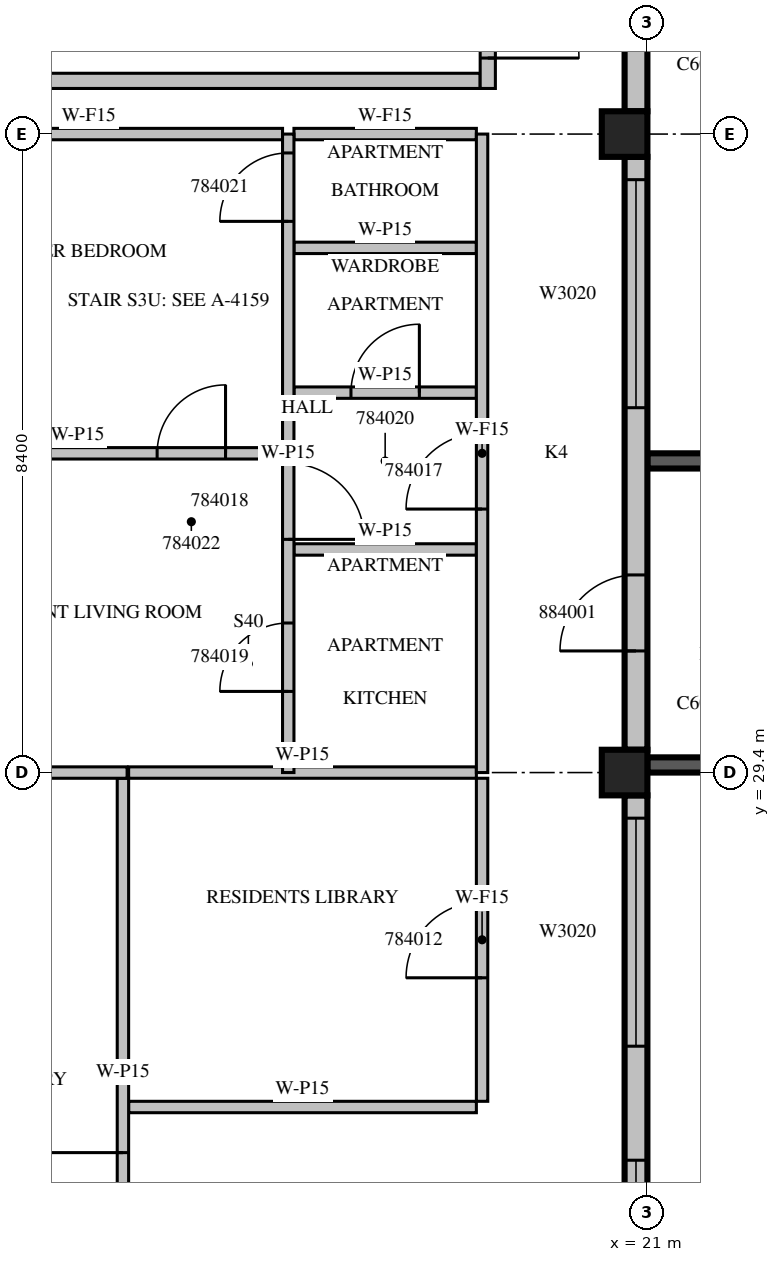
"""IFC4 building model, lengths in metres.
Left out: names, types, materials, properties, quantities, classifications, styles, units other than length and angle.
Written with IfcOpenShell. Run it as: python <this file> out.ifc"""

import sys

from ifc_helpers import new_model, si_unit, direction, frame, frame_2d, origin, origin_2d, place, context, subcontext, project, spatial, rectangle, extrude, source, transform, mapped, element, fill, save


model = new_model("IFC4")
c1 = context("Model", 3, precision=1e-05, world=origin(), true_north=direction((0.0, 1.0)))
c2 = subcontext(c1, "Body", "Model", "MODEL_VIEW")
j1 = project(units=[si_unit("LENGTHUNIT", "METRE"), si_unit("PLANEANGLEUNIT", "RADIAN")], contexts=[c1])
p1 = place(None, origin())
s1 = spatial("IfcSite", under=j1, at=p1, CompositionType="ELEMENT")
p2 = place(p1, origin())
s2 = spatial("IfcBuilding", under=s1, at=p2, CompositionType="ELEMENT")
p3 = place(p2, frame((0.0, 0.0, 354.5)))
s3 = spatial("IfcBuildingStorey", under=s2, at=p3, CompositionType="ELEMENT", Elevation=354.5)
m1 = source(origin(), c2, "Body", "SweptSolid", [
    extrude(rectangle(XDim=0.6, YDim=0.6, at=origin_2d()), origin(), (0.0, 0.0, 1.0), 3.5),
])
for number, where, z_axis, x_axis in (
    (1, (20.7, 29.4, 0.0), (0.0, 0.0, 1.0), (1.0, 0.0, 0.0)),
    (2, (20.7, 37.8, 0.0), (0.0, 0.0, 1.0), (1.0, 0.0, 0.0)),
):
    element("IfcColumn", number, at=place(p3, frame(where, z_axis=z_axis, x_axis=x_axis)), inside=s3, PredefinedType="COLUMN", context=c2, shape_type="MappedRepresentation", body=[
        mapped(m1, transform((0.0, 0.0, 0.0), scale=1.0)),
    ])
m2 = source(origin(), c2, "Body", "SweptSolid", [
    extrude(rectangle(XDim=3.9, YDim=0.2, at=frame_2d((1.95, 0.0))), origin(), (0.0, 0.0, 1.0), 3.1),
])
p4 = place(p3, frame((21.0, 29.5, 0.0), z_axis=(0.0, 0.0, 1.0), x_axis=(1.0, 0.0, 0.0)))
e3 = element("IfcWall", 3, at=p4, inside=s3, PredefinedType="SOLIDWALL", context=c2, shape_type="MappedRepresentation", body=[
    mapped(m2, transform((0.0, 0.0, 0.0), scale=1.0)),
])
m3 = source(origin(), c2, "Body", "SweptSolid", [
    extrude(rectangle(XDim=2.4, YDim=2.0, at=frame_2d((1.2, 1.0))), frame((0.0, 0.11, 0.0), z_axis=(0.0, -1.0, 0.0), x_axis=(1.0, 0.0, 0.0)), (0.0, 0.0, 1.0), 0.22),
])
p5 = place(p4, frame((0.75, 0.0, 0.6)))
e4 = element("IfcOpeningElement", 4, at=p5, cuts=e3, PredefinedType="OPENING", context=c2, shape_type="MappedRepresentation", body=[
    mapped(m3, transform((0.0, 0.0, 0.0), scale=1.0)),
])
p6 = place(p3, frame((21.0, 33.5, 0.0), z_axis=(0.0, 0.0, 1.0), x_axis=(1.0, 0.0, 0.0)))
e5 = element("IfcWall", 5, at=p6, inside=s3, PredefinedType="SOLIDWALL", context=c2, shape_type="MappedRepresentation", body=[
    mapped(m2, transform((0.0, 0.0, 0.0), scale=1.0)),
])
p7 = place(p6, frame((0.75, 0.0, 0.6)))
e6 = element("IfcOpeningElement", 6, at=p7, cuts=e5, PredefinedType="OPENING", context=c2, shape_type="MappedRepresentation", body=[
    mapped(m3, transform((0.0, 0.0, 0.0), scale=1.0)),
])
m4 = source(origin(), c2, "Body", "SweptSolid", [
    extrude(rectangle(XDim=7.5, YDim=0.3, at=frame_2d((3.75, 0.0))), origin(), (0.0, 0.0, 1.0), 3.1),
])
p8 = place(p3, frame((20.85, 21.6, 0.0), z_axis=(0.0, 0.0, 1.0), x_axis=(0.0, 1.0, 0.0)))
e7 = element("IfcWall", 7, at=p8, inside=s3, PredefinedType="STANDARD", context=c2, shape_type="MappedRepresentation", body=[
    mapped(m4, transform((0.0, 0.0, 0.0), scale=1.0)),
])
m5 = source(origin(), c2, "Body", "SweptSolid", [
    extrude(rectangle(XDim=2.4, YDim=2.0, at=frame_2d((1.2, 1.0))), frame((0.0, 0.16, 0.0), z_axis=(0.0, -1.0, 0.0), x_axis=(1.0, 0.0, 0.0)), (0.0, 0.0, 1.0), 0.32),
])
p9 = place(p8, frame((0.3, 0.0, 0.6)))
e8 = element("IfcOpeningElement", 8, at=p9, cuts=e7, PredefinedType="OPENING", context=c2, shape_type="MappedRepresentation", body=[
    mapped(m5, transform((0.0, 0.0, 0.0), scale=1.0)),
])
m6 = source(origin(), c2, "Body", "SweptSolid", [
    extrude(rectangle(XDim=3.0, YDim=2.0, at=frame_2d((1.5, 1.0))), frame((0.0, 0.16, 0.0), z_axis=(0.0, -1.0, 0.0), x_axis=(1.0, 0.0, 0.0)), (0.0, 0.0, 1.0), 0.32),
])
p10 = place(p8, frame((4.2, 0.0, 0.6)))
e9 = element("IfcOpeningElement", 9, at=p10, cuts=e7, PredefinedType="OPENING", context=c2, shape_type="MappedRepresentation", body=[
    mapped(m6, transform((0.0, 0.0, 0.0), scale=1.0)),
])
m7 = source(origin(), c2, "Body", "SweptSolid", [
    extrude(rectangle(XDim=7.8, YDim=0.3, at=frame_2d((3.9, 0.0))), origin(), (0.0, 0.0, 1.0), 3.1),
])
p11 = place(p3, frame((20.85, 29.7, 0.0), z_axis=(0.0, 0.0, 1.0), x_axis=(0.0, 1.0, 0.0)))
e10 = element("IfcWall", 10, at=p11, inside=s3, PredefinedType="STANDARD", context=c2, shape_type="MappedRepresentation", body=[
    mapped(m7, transform((0.0, 0.0, 0.0), scale=1.0)),
])
p12 = place(p11, frame((4.5, 0.0, 0.6)))
e11 = element("IfcOpeningElement", 11, at=p12, cuts=e10, PredefinedType="OPENING", context=c2, shape_type="MappedRepresentation", body=[
    mapped(m6, transform((0.0, 0.0, 0.0), scale=1.0)),
])
m8 = source(origin(), c2, "Body", "SweptSolid", [
    extrude(rectangle(XDim=1.0, YDim=2.1, at=frame_2d((0.5, 1.05))), frame((0.0, 0.16, 0.0), z_axis=(0.0, -1.0, 0.0), x_axis=(1.0, 0.0, 0.0)), (0.0, 0.0, 1.0), 0.32),
])
p13 = place(p11, frame((1.3, 0.0, 0.0)))
e12 = element("IfcOpeningElement", 12, at=p13, cuts=e10, PredefinedType="OPENING", context=c2, shape_type="MappedRepresentation", body=[
    mapped(m8, transform((0.0, 0.0, 0.0), scale=1.0)),
])
m9 = source(origin(), c2, "Body", "SweptSolid", [
    extrude(rectangle(XDim=5.58, YDim=0.3, at=frame_2d((2.79, 0.0))), origin(), (0.0, 0.0, 1.0), 3.1),
])
p14 = place(p3, frame((20.85, 38.1, 0.0), z_axis=(0.0, 0.0, 1.0), x_axis=(0.0, 1.0, 0.0)))
e13 = element("IfcWall", 13, at=p14, inside=s3, PredefinedType="STANDARD", context=c2, shape_type="MappedRepresentation", body=[
    mapped(m9, transform((0.0, 0.0, 0.0), scale=1.0)),
])
m10 = source(origin(), c2, "Body", "SweptSolid", [
    extrude(rectangle(XDim=3.6, YDim=2.0, at=frame_2d((1.8, 1.0))), frame((0.0, 0.16, 0.0), z_axis=(0.0, -1.0, 0.0), x_axis=(1.0, 0.0, 0.0)), (0.0, 0.0, 1.0), 0.32),
])
p15 = place(p14, frame((0.84, 0.0, 0.6)))
e14 = element("IfcOpeningElement", 14, at=p15, cuts=e13, PredefinedType="OPENING", context=c2, shape_type="MappedRepresentation", body=[
    mapped(m10, transform((0.0, 0.0, 0.0), scale=1.0)),
])
m11 = source(origin(), c2, "Body", "SweptSolid", [
    extrude(rectangle(XDim=8.0, YDim=0.2, at=frame_2d((4.0, 0.0))), origin(), (0.0, 0.0, 1.0), 3.1),
])
p16 = place(p3, frame((10.8, 38.5, 0.0), z_axis=(0.0, 0.0, 1.0), x_axis=(1.0, 0.0, 0.0)))
e15 = element("IfcWall", 15, at=p16, inside=s3, PredefinedType="PARTITIONING", context=c2, shape_type="MappedRepresentation", body=[
    mapped(m11, transform((0.0, 0.0, 0.0), scale=1.0)),
])
m12 = source(origin(), c2, "Body", "SweptSolid", [
    extrude(rectangle(XDim=5.45, YDim=0.2, at=frame_2d((2.725, 0.0))), origin(), (0.0, 0.0, 1.0), 3.1),
])
p17 = place(p3, frame((18.9, 38.4, 0.0), z_axis=(0.0, 0.0, 1.0), x_axis=(0.0, 1.0, 0.0)))
e16 = element("IfcWall", 16, at=p17, inside=s3, PredefinedType="PARTITIONING", context=c2, shape_type="MappedRepresentation", body=[
    mapped(m12, transform((0.0, 0.0, 0.0), scale=1.0)),
])
m13 = source(origin(), c2, "Body", "SweptSolid", [
    extrude(rectangle(XDim=1.2, YDim=2.1, at=frame_2d((0.6, 1.05))), frame((0.0, 0.11, 0.0), z_axis=(0.0, -1.0, 0.0), x_axis=(1.0, 0.0, 0.0)), (0.0, 0.0, 1.0), 0.22),
])
p18 = place(p17, frame((0.4, 0.0, 0.0)))
e17 = element("IfcOpeningElement", 17, at=p18, cuts=e16, PredefinedType="OPENING", context=c2, shape_type="MappedRepresentation", body=[
    mapped(m13, transform((0.0, 0.0, 0.0), scale=1.0)),
])
m14 = source(origin(), c2, "Body", "SweptSolid", [
    extrude(rectangle(XDim=0.9, YDim=2.1, at=frame_2d((0.45, 1.05))), frame((0.0, 0.11, 0.0), z_axis=(0.0, -1.0, 0.0), x_axis=(1.0, 0.0, 0.0)), (0.0, 0.0, 1.0), 0.22),
])
p19 = place(p17, frame((3.25, 0.0, 0.0)))
e18 = element("IfcOpeningElement", 18, at=p19, cuts=e16, PredefinedType="OPENING", context=c2, shape_type="MappedRepresentation", body=[
    mapped(m14, transform((0.0, 0.0, 0.0), scale=1.0)),
])
m15 = source(origin(), c2, "Body", "SweptSolid", [
    extrude(rectangle(XDim=4.575, YDim=0.15, at=frame_2d((2.288, 0.0))), origin(), (0.0, 0.0, 1.0), 3.1),
])
for number, where, z_axis, x_axis in (
    (19, (14.175, 25.0, 0.0), (0.0, 0.0, 1.0), (1.0, 0.0, 0.0)),
    (20, (18.75, 29.4, 0.0), (0.0, 0.0, 1.0), (-1.0, 0.0, 0.0)),
):
    element("IfcWall", number, at=place(p3, frame(where, z_axis=z_axis, x_axis=x_axis)), inside=s3, PredefinedType="PARTITIONING", context=c2, shape_type="MappedRepresentation", body=[
        mapped(m15, transform((0.0, 0.0, 0.0), scale=1.0)),
    ])
m16 = source(origin(), c2, "Body", "SweptSolid", [
    extrude(rectangle(XDim=4.25, YDim=0.15, at=frame_2d((2.125, 0.0))), origin(), (0.0, 0.0, 1.0), 3.1),
])
p20 = place(p3, frame((18.825, 25.075, 0.0), z_axis=(0.0, 0.0, 1.0), x_axis=(0.0, 1.0, 0.0)))
e21 = element("IfcWall", 21, at=p20, inside=s3, PredefinedType="PARTITIONING", context=c2, shape_type="MappedRepresentation", body=[
    mapped(m16, transform((0.0, 0.0, 0.0), scale=1.0)),
])
m17 = source(origin(), c2, "Body", "SweptSolid", [
    extrude(rectangle(XDim=1.0, YDim=2.1, at=frame_2d((0.5, 1.05))), frame((0.0, 0.085, 0.0), z_axis=(0.0, -1.0, 0.0), x_axis=(1.0, 0.0, 0.0)), (0.0, 0.0, 1.0), 0.17),
])
p21 = place(p20, frame((1.625, 0.0, 0.0)))
e22 = element("IfcOpeningElement", 22, at=p21, cuts=e21, PredefinedType="OPENING", context=c2, shape_type="MappedRepresentation", body=[
    mapped(m17, transform((0.0, 0.0, 0.0), scale=1.0)),
])
m18 = source(origin(), c2, "Body", "SweptSolid", [
    extrude(rectangle(XDim=7.725, YDim=0.15, at=frame_2d((3.862, 0.0))), origin(), (0.0, 0.0, 1.0), 3.1),
])
p22 = place(p3, frame((14.1, 29.325, 0.0), z_axis=(0.0, 0.0, 1.0), x_axis=(0.0, -1.0, 0.0)))
e23 = element("IfcWall", 23, at=p22, inside=s3, PredefinedType="PARTITIONING", context=c2, shape_type="MappedRepresentation", body=[
    mapped(m18, transform((0.0, 0.0, 0.0), scale=1.0)),
])
m19 = source(origin(), c2, "Body", "SweptSolid", [
    extrude(rectangle(XDim=2.2, YDim=2.1, at=frame_2d((1.1, 1.05))), frame((0.0, 0.085, 0.0), z_axis=(0.0, -1.0, 0.0), x_axis=(1.0, 0.0, 0.0)), (0.0, 0.0, 1.0), 0.17),
])
p23 = place(p22, frame((4.925, 0.0, 0.0)))
e24 = element("IfcOpeningElement", 24, at=p23, cuts=e23, PredefinedType="OPENING", context=c2, shape_type="MappedRepresentation", body=[
    mapped(m19, transform((0.0, 0.0, 0.0), scale=1.0)),
])
m20 = source(origin(), c2, "Body", "SweptSolid", [
    extrude(rectangle(XDim=5.4, YDim=0.15, at=frame_2d((2.7, 0.0))), origin(), (0.0, 0.0, 1.0), 3.1),
])
p24 = place(p3, frame((16.2, 33.6, 0.0), z_axis=(0.0, 0.0, 1.0), x_axis=(-1.0, 0.0, 0.0)))
e25 = element("IfcWall", 25, at=p24, inside=s3, PredefinedType="PARTITIONING", context=c2, shape_type="MappedRepresentation", body=[
    mapped(m20, transform((0.0, 0.0, 0.0), scale=1.0)),
])
m21 = source(origin(), c2, "Body", "SweptSolid", [
    extrude(rectangle(XDim=0.9, YDim=2.1, at=frame_2d((0.45, 1.05))), frame((0.0, 0.085, 0.0), z_axis=(0.0, -1.0, 0.0), x_axis=(1.0, 0.0, 0.0)), (0.0, 0.0, 1.0), 0.17),
])
p25 = place(p24, frame((0.75, 0.0, 0.0)))
e26 = element("IfcOpeningElement", 26, at=p25, cuts=e25, PredefinedType="OPENING", context=c2, shape_type="MappedRepresentation", body=[
    mapped(m21, transform((0.0, 0.0, 0.0), scale=1.0)),
])
m22 = source(origin(), c2, "Body", "SweptSolid", [
    extrude(rectangle(XDim=2.4, YDim=0.15, at=frame_2d((1.2, 0.0))), origin(), (0.0, 0.0, 1.0), 3.1),
])
p26 = place(p3, frame((18.75, 32.335, 0.0), z_axis=(0.0, 0.0, 1.0), x_axis=(-1.0, 0.0, 0.0)))
e27 = element("IfcWall", 27, at=p26, inside=s3, PredefinedType="PARTITIONING", context=c2, shape_type="MappedRepresentation", body=[
    mapped(m22, transform((0.0, 0.0, 0.0), scale=1.0)),
])
p27 = place(p3, frame((18.75, 34.398, 0.0), z_axis=(0.0, 0.0, 1.0), x_axis=(-1.0, 0.0, 0.0)))
e28 = element("IfcWall", 28, at=p27, inside=s3, PredefinedType="PARTITIONING", context=c2, shape_type="MappedRepresentation", body=[
    mapped(m22, transform((0.0, 0.0, 0.0), scale=1.0)),
])
p28 = place(p27, frame((0.75, 0.0, 0.0)))
e29 = element("IfcOpeningElement", 29, at=p28, cuts=e28, PredefinedType="OPENING", context=c2, shape_type="MappedRepresentation", body=[
    mapped(m21, transform((0.0, 0.0, 0.0), scale=1.0)),
])
p29 = place(p3, frame((18.75, 36.303, 0.0), z_axis=(0.0, 0.0, 1.0), x_axis=(-1.0, 0.0, 0.0)))
e30 = element("IfcWall", 30, at=p29, inside=s3, PredefinedType="PARTITIONING", context=c2, shape_type="MappedRepresentation", body=[
    mapped(m22, transform((0.0, 0.0, 0.0), scale=1.0)),
])
m23 = source(origin(), c2, "Body", "SweptSolid", [
    extrude(rectangle(XDim=3.056, YDim=0.15, at=frame_2d((1.528, 0.0))), origin(), (0.0, 0.0, 1.0), 3.1),
])
p30 = place(p3, frame((14.155, 29.4, 0.0), z_axis=(0.0, 0.0, 1.0), x_axis=(-1.0, 0.0, 0.0)))
e31 = element("IfcWall", 31, at=p30, inside=s3, PredefinedType="PARTITIONING", context=c2, shape_type="MappedRepresentation", body=[
    mapped(m23, transform((0.0, 0.0, 0.0), scale=1.0)),
])
m24 = source(origin(), c2, "Body", "SweptSolid", [
    extrude(rectangle(XDim=5.101, YDim=0.15, at=frame_2d((2.55, 0.0))), origin(), (0.0, 0.0, 1.0), 3.1),
])
p31 = place(p3, frame((16.2, 37.8, 0.0), z_axis=(0.0, 0.0, 1.0), x_axis=(-1.0, 0.0, 0.0)))
e32 = element("IfcWall", 32, at=p31, inside=s3, PredefinedType="PARTITIONING", context=c2, shape_type="MappedRepresentation", body=[
    mapped(m24, transform((0.0, 0.0, 0.0), scale=1.0)),
])
p32 = place(p3, frame((18.75, 37.8, 0.0), z_axis=(0.0, 0.0, 1.0), x_axis=(-1.0, 0.0, 0.0)))
e33 = element("IfcWall", 33, at=p32, inside=s3, PredefinedType="PARTITIONING", context=c2, shape_type="MappedRepresentation", body=[
    mapped(m22, transform((0.0, 0.0, 0.0), scale=1.0)),
])
m25 = source(origin(), c2, "Body", "SweptSolid", [
    extrude(rectangle(XDim=8.4, YDim=0.15, at=frame_2d((4.2, 0.0))), origin(), (0.0, 0.0, 1.0), 3.1),
])
p33 = place(p3, frame((16.275, 29.4, 0.0), z_axis=(0.0, 0.0, 1.0), x_axis=(0.0, 1.0, 0.0)))
e34 = element("IfcWall", 34, at=p33, inside=s3, PredefinedType="PARTITIONING", context=c2, shape_type="MappedRepresentation", body=[
    mapped(m25, transform((0.0, 0.0, 0.0), scale=1.0)),
])
p34 = place(p33, frame((3.068, 0.0, 0.0)))
e35 = element("IfcOpeningElement", 35, at=p34, cuts=e34, PredefinedType="OPENING", context=c2, shape_type="MappedRepresentation", body=[
    mapped(m17, transform((0.0, 0.0, 0.0), scale=1.0)),
])
p35 = place(p33, frame((1.067, 0.0, 0.0)))
e36 = element("IfcOpeningElement", 36, at=p35, cuts=e34, PredefinedType="OPENING", context=c2, shape_type="MappedRepresentation", body=[
    mapped(m21, transform((0.0, 0.0, 0.0), scale=1.0)),
])
p36 = place(p33, frame((7.252, 0.0, 0.0)))
e37 = element("IfcOpeningElement", 37, at=p36, cuts=e34, PredefinedType="OPENING", context=c2, shape_type="MappedRepresentation", body=[
    mapped(m21, transform((0.0, 0.0, 0.0), scale=1.0)),
])
p37 = place(p3, frame((18.825, 29.4, 0.0), z_axis=(0.0, 0.0, 1.0), x_axis=(0.0, 1.0, 0.0)))
e38 = element("IfcWall", 38, at=p37, inside=s3, PredefinedType="PARTITIONING", context=c2, shape_type="MappedRepresentation", body=[
    mapped(m25, transform((0.0, 0.0, 0.0), scale=1.0)),
])
p38 = place(p37, frame((3.467, 0.0, 0.0)))
e39 = element("IfcOpeningElement", 39, at=p38, cuts=e38, PredefinedType="OPENING", context=c2, shape_type="MappedRepresentation", body=[
    mapped(m17, transform((0.0, 0.0, 0.0), scale=1.0)),
])
m26 = source(origin(), c2, "Body", "SweptSolid", [
    extrude(rectangle(XDim=2.4, YDim=2.0, at=frame_2d((1.2, 1.0))), frame((0.0, 0.03, 0.0), z_axis=(0.0, -1.0, 0.0), x_axis=(1.0, 0.0, 0.0)), (0.0, 0.0, 1.0), 0.06),
])
p39 = place(p9, origin())
e40 = element("IfcWindow", 40, at=p39, inside=s3, PartitioningType="SINGLE_PANEL", PredefinedType="WINDOW", context=c2, shape_type="MappedRepresentation", body=[
    mapped(m26, transform((0.0, 0.0, 0.0), scale=1.0)),
])
fill(e8, e40)
m27 = source(origin(), c2, "Body", "SweptSolid", [
    extrude(rectangle(XDim=3.0, YDim=2.0, at=frame_2d((1.5, 1.0))), frame((0.0, 0.03, 0.0), z_axis=(0.0, -1.0, 0.0), x_axis=(1.0, 0.0, 0.0)), (0.0, 0.0, 1.0), 0.06),
])
p40 = place(p10, origin())
e41 = element("IfcWindow", 41, at=p40, inside=s3, PartitioningType="SINGLE_PANEL", PredefinedType="WINDOW", context=c2, shape_type="MappedRepresentation", body=[
    mapped(m27, transform((0.0, 0.0, 0.0), scale=1.0)),
])
fill(e9, e41)
p41 = place(p12, origin())
e42 = element("IfcWindow", 42, at=p41, inside=s3, PartitioningType="SINGLE_PANEL", PredefinedType="WINDOW", context=c2, shape_type="MappedRepresentation", body=[
    mapped(m27, transform((0.0, 0.0, 0.0), scale=1.0)),
])
fill(e11, e42)
m28 = source(origin(), c2, "Body", "SweptSolid", [
    extrude(rectangle(XDim=1.2, YDim=2.1, at=frame_2d((0.6, 1.05))), frame((0.0, 0.025, 0.0), z_axis=(0.0, -1.0, 0.0), x_axis=(1.0, 0.0, 0.0)), (0.0, 0.0, 1.0), 0.05),
])
p42 = place(p18, origin())
e43 = element("IfcDoor", 43, at=p42, inside=s3, OperationType="SINGLE_SWING_RIGHT", PredefinedType="DOOR", context=c2, shape_type="MappedRepresentation", body=[
    mapped(m28, transform((0.0, 0.0, 0.0), scale=1.0)),
])
fill(e17, e43)
m29 = source(origin(), c2, "Body", "SweptSolid", [
    extrude(rectangle(XDim=1.0, YDim=2.1, at=frame_2d((0.5, 1.05))), frame((0.0, 0.025, 0.0), z_axis=(0.0, -1.0, 0.0), x_axis=(1.0, 0.0, 0.0)), (0.0, 0.0, 1.0), 0.05),
])
p43 = place(p21, origin())
e44 = element("IfcDoor", 44, at=p43, inside=s3, OperationType="SINGLE_SWING_LEFT", PredefinedType="DOOR", context=c2, shape_type="MappedRepresentation", body=[
    mapped(m29, transform((0.0, 0.0, 0.0), scale=1.0)),
])
fill(e22, e44)
m30 = source(origin(), c2, "Body", "SweptSolid", [
    extrude(rectangle(XDim=2.2, YDim=2.1, at=frame_2d((1.1, 1.05))), frame((0.0, 0.025, 0.0), z_axis=(0.0, -1.0, 0.0), x_axis=(1.0, 0.0, 0.0)), (0.0, 0.0, 1.0), 0.05),
])
p44 = place(p23, origin())
e45 = element("IfcDoor", 45, at=p44, inside=s3, OperationType="DOUBLE_DOOR_SINGLE_SWING", PredefinedType="DOOR", context=c2, shape_type="MappedRepresentation", body=[
    mapped(m30, transform((0.0, 0.0, 0.0), scale=1.0)),
])
fill(e24, e45)
p45 = place(p38, origin())
e46 = element("IfcDoor", 46, at=p45, inside=s3, OperationType="SINGLE_SWING_LEFT", PredefinedType="DOOR", context=c2, shape_type="MappedRepresentation", body=[
    mapped(m29, transform((0.0, 0.0, 0.0), scale=1.0)),
])
fill(e39, e46)
p46 = place(p34, origin())
e47 = element("IfcDoor", 47, at=p46, inside=s3, OperationType="SINGLE_SWING_RIGHT", PredefinedType="DOOR", context=c2, shape_type="MappedRepresentation", body=[
    mapped(m29, transform((0.0, 0.0, 0.0), scale=1.0)),
])
fill(e35, e47)
m31 = source(origin(), c2, "Body", "SweptSolid", [
    extrude(rectangle(XDim=0.9, YDim=2.1, at=frame_2d((0.45, 1.05))), frame((0.0, 0.025, 0.0), z_axis=(0.0, -1.0, 0.0), x_axis=(1.0, 0.0, 0.0)), (0.0, 0.0, 1.0), 0.05),
])
p47 = place(p35, origin())
e48 = element("IfcDoor", 48, at=p47, inside=s3, OperationType="SINGLE_SWING_LEFT", PredefinedType="DOOR", context=c2, shape_type="MappedRepresentation", body=[
    mapped(m31, transform((0.0, 0.0, 0.0), scale=1.0)),
])
fill(e36, e48)
p48 = place(p28, origin())
e49 = element("IfcDoor", 49, at=p48, inside=s3, OperationType="SINGLE_SWING_RIGHT", PredefinedType="DOOR", context=c2, shape_type="MappedRepresentation", body=[
    mapped(m31, transform((0.0, 0.0, 0.0), scale=1.0)),
])
fill(e29, e49)
p49 = place(p36, origin())
e50 = element("IfcDoor", 50, at=p49, inside=s3, OperationType="SINGLE_SWING_LEFT", PredefinedType="DOOR", context=c2, shape_type="MappedRepresentation", body=[
    mapped(m31, transform((0.0, 0.0, 0.0), scale=1.0)),
])
fill(e37, e50)
p50 = place(p25, origin())
e51 = element("IfcDoor", 51, at=p50, inside=s3, OperationType="SINGLE_SWING_RIGHT", PredefinedType="DOOR", context=c2, shape_type="MappedRepresentation", body=[
    mapped(m31, transform((0.0, 0.0, 0.0), scale=1.0)),
])
fill(e26, e51)
p51 = place(p13, origin())
e52 = element("IfcDoor", 52, at=p51, inside=s3, OperationType="SINGLE_SWING_LEFT", PredefinedType="DOOR", context=c2, shape_type="MappedRepresentation", body=[
    mapped(m29, transform((0.0, 0.0, 0.0), scale=1.0)),
])
fill(e12, e52)
save(model, sys.argv[1])
